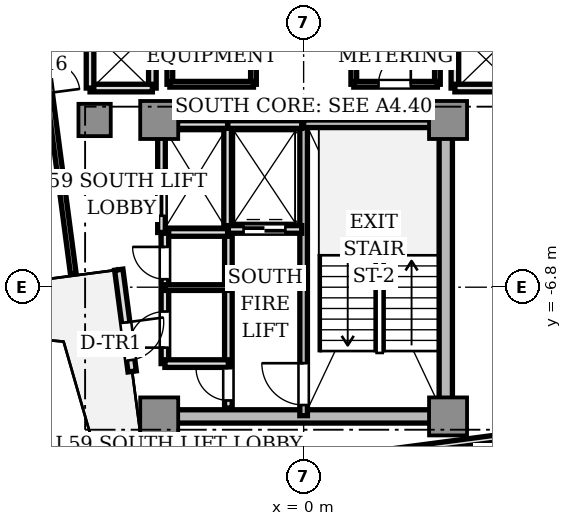
"""IFC4 building model, lengths in metres.
Left out: names, types, materials, properties, quantities, classifications, styles, units other than length and angle.
Written with IfcOpenShell. Run it as: python <this file> out.ifc"""

import sys

from ifc_helpers import new_model, si_unit, direction, frame, frame_2d, origin, origin_2d, place, context, subcontext, project, spatial, rectangle, extrude, source, transform, mapped, element, fill, save


model = new_model("IFC4")
c1 = context("Model", 3, precision=1e-05, world=origin(), true_north=direction((0.0, 1.0)))
c2 = subcontext(c1, "Body", "Model", "MODEL_VIEW")
j1 = project(units=[si_unit("LENGTHUNIT", "METRE"), si_unit("PLANEANGLEUNIT", "RADIAN")], contexts=[c1])
p1 = place(None, origin())
s1 = spatial("IfcSite", under=j1, at=p1, CompositionType="ELEMENT")
p2 = place(p1, origin())
s2 = spatial("IfcBuilding", under=s1, at=p2, CompositionType="ELEMENT")
p3 = place(p2, frame((0.0, 0.0, 213.2)))
s3 = spatial("IfcBuildingStorey", under=s2, at=p3, CompositionType="ELEMENT", Elevation=213.2)
p4 = place(p3, frame((-3.55, -10.2, 0.0), z_axis=(0.0, 0.0, 1.0), x_axis=(1.0, 0.0, 0.0)))
e1 = element("IfcWall", 1, at=p4, inside=s3, PredefinedType="SHEAR", context=c2, shape_type="SweptSolid", body=[
    extrude(rectangle(XDim=7.1, YDim=0.35, at=frame_2d((3.55, 0.0))), origin(), (0.0, 0.0, 1.0), 3.11),
])
p5 = place(p3, frame((3.74, -9.75, 0.0), z_axis=(0.0, 0.0, 1.0), x_axis=(0.0, 1.0, 0.0)))
e2 = element("IfcWall", 2, at=p5, inside=s3, PredefinedType="SHEAR", context=c2, shape_type="SweptSolid", body=[
    extrude(rectangle(XDim=6.9, YDim=0.35, at=frame_2d((3.45, 0.0))), origin(), (0.0, 0.0, 1.0), 3.11),
])
m1 = source(origin(), c2, "Body", "SweptSolid", [
    extrude(rectangle(XDim=1.0, YDim=1.0, at=origin_2d()), origin(), (0.0, 0.0, 1.0), 3.11),
])
for number, where, z_axis, x_axis in (
    (3, (-3.8, -2.4, 0.0), (0.0, 0.0, 1.0), (1.0, 0.0, 0.0)),
    (4, (3.8, -2.4, 0.0), (0.0, 0.0, 1.0), (1.0, 0.0, 0.0)),
    (5, (-3.8, -10.2, 0.0), (0.0, 0.0, 1.0), (1.0, 0.0, 0.0)),
    (6, (3.8, -10.2, 0.0), (0.0, 0.0, 1.0), (1.0, 0.0, 0.0)),
):
    element("IfcColumn", number, at=place(p3, frame(where, z_axis=z_axis, x_axis=x_axis)), inside=s3, PredefinedType="COLUMN", context=c2, shape_type="MappedRepresentation", body=[
        mapped(m1, transform((0.0, 0.0, 0.0), scale=1.0)),
    ])
m2 = source(origin(), c2, "Body", "SweptSolid", [
    extrude(rectangle(XDim=0.85, YDim=0.85, at=origin_2d()), origin(), (0.0, 0.0, 1.0), 3.11),
])
p6 = place(p3, frame((-5.5, -2.4, 0.0), z_axis=(0.0, 0.0, 1.0), x_axis=(1.0, 0.0, 0.0)))
e7 = element("IfcColumn", 7, at=p6, inside=s3, PredefinedType="COLUMN", context=c2, shape_type="MappedRepresentation", body=[
    mapped(m2, transform((0.0, 0.0, 0.0), scale=1.0)),
])
p7 = place(p3, frame((-4.864, -6.339, 0.0), z_axis=(0.0, 0.0, 1.0), x_axis=(0.130564442062, -0.991439824936, 0.0)))
e8 = element("IfcWall", 8, at=p7, inside=s3, PredefinedType="STANDARD", context=c2, shape_type="SweptSolid", body=[
    extrude(rectangle(XDim=2.7, YDim=0.22, at=frame_2d((1.35, 0.0))), origin(), (0.0, 0.0, 1.0), 3.11),
])
p8 = place(p7, frame((1.4, 0.0, 0.0)))
e9 = element("IfcOpeningElement", 9, at=p8, cuts=e8, PredefinedType="OPENING", context=c2, shape_type="SweptSolid", body=[
    extrude(rectangle(XDim=1.0, YDim=2.2, at=frame_2d((0.5, 1.1))), frame((0.0, 0.12, 0.0), z_axis=(0.0, -1.0, 0.0), x_axis=(1.0, 0.0, 0.0)), (0.0, 0.0, 1.0), 0.24),
])
p9 = place(p3, frame((0.0, -10.18, 0.0), z_axis=(0.0, 0.0, 1.0), x_axis=(0.0, 1.0, 0.0)))
e10 = element("IfcWall", 10, at=p9, inside=s3, PredefinedType="SOLIDWALL", context=c2, shape_type="SweptSolid", body=[
    extrude(rectangle(XDim=7.68, YDim=0.2, at=frame_2d((3.84, 0.0))), origin(), (0.0, 0.0, 1.0), 3.11),
])
p10 = place(p9, frame((0.28, 0.0, 0.0)))
e11 = element("IfcOpeningElement", 11, at=p10, cuts=e10, PredefinedType="OPENING", context=c2, shape_type="SweptSolid", body=[
    extrude(rectangle(XDim=1.1, YDim=2.15, at=frame_2d((0.55, 1.075))), frame((0.0, 0.11, 0.0), z_axis=(0.0, -1.0, 0.0), x_axis=(1.0, 0.0, 0.0)), (0.0, 0.0, 1.0), 0.22),
])
p11 = place(p3, frame((0.0, -2.5, 0.0), z_axis=(0.0, 0.0, 1.0), x_axis=(1.0, 0.0, 0.0)))
e12 = element("IfcWall", 12, at=p11, inside=s3, PredefinedType="SOLIDWALL", context=c2, shape_type="SweptSolid", body=[
    extrude(rectangle(XDim=3.72, YDim=0.2, at=frame_2d((1.86, 0.0))), origin(), (0.0, 0.0, 1.0), 3.11),
])
p12 = place(p3, frame((-1.98, -9.98, 0.0), z_axis=(0.0, 0.0, 1.0), x_axis=(0.0, 1.0, 0.0)))
e13 = element("IfcWall", 13, at=p12, inside=s3, PredefinedType="SOLIDWALL", context=c2, shape_type="SweptSolid", body=[
    extrude(rectangle(XDim=4.66, YDim=0.2, at=frame_2d((2.33, 0.0))), origin(), (0.0, 0.0, 1.0), 2.66),
])
p13 = place(p12, frame((0.2, 0.0, 0.0)))
e14 = element("IfcOpeningElement", 14, at=p13, cuts=e13, PredefinedType="OPENING", context=c2, shape_type="SweptSolid", body=[
    extrude(rectangle(XDim=0.85, YDim=2.1, at=frame_2d((0.425, 1.05))), frame((0.0, 0.11, 0.0), z_axis=(0.0, -1.0, 0.0), x_axis=(1.0, 0.0, 0.0)), (0.0, 0.0, 1.0), 0.22),
])
p14 = place(p3, frame((-2.0, -5.28, 0.0), z_axis=(0.0, 0.0, 1.0), x_axis=(0.0, 1.0, 0.0)))
e15 = element("IfcWall", 15, at=p14, inside=s3, PredefinedType="SOLIDWALL", context=c2, shape_type="SweptSolid", body=[
    extrude(rectangle(XDim=2.78, YDim=0.2, at=frame_2d((1.39, 0.0))), origin(), (0.0, 0.0, 1.0), 2.66),
])
p15 = place(p3, frame((-2.0, -2.52, 0.0), z_axis=(0.0, 0.0, 1.0), x_axis=(1.0, 0.0, 0.0)))
e16 = element("IfcWall", 16, at=p15, inside=s3, PredefinedType="SOLIDWALL", context=c2, shape_type="SweptSolid", body=[
    extrude(rectangle(XDim=1.95, YDim=0.2, at=frame_2d((0.975, 0.0))), origin(), (0.0, 0.0, 1.0), 2.66),
])
p16 = place(p3, frame((-1.98, -5.28, 0.0), z_axis=(0.0, 0.0, 1.0), x_axis=(1.0, 0.0, 0.0)))
e17 = element("IfcWall", 17, at=p16, inside=s3, PredefinedType="SOLIDWALL", context=c2, shape_type="SweptSolid", body=[
    extrude(rectangle(XDim=1.93, YDim=0.2, at=frame_2d((0.965, 0.0))), origin(), (0.0, 0.0, 1.0), 2.66),
])
p17 = place(p16, frame((0.4, 0.0, 0.0)))
e18 = element("IfcOpeningElement", 18, at=p17, cuts=e17, PredefinedType="OPENING", context=c2, shape_type="SweptSolid", body=[
    extrude(rectangle(XDim=1.1, YDim=2.2, at=frame_2d((0.55, 1.1))), frame((0.0, 0.11, 0.0), z_axis=(0.0, -1.0, 0.0), x_axis=(1.0, 0.0, 0.0)), (0.0, 0.0, 1.0), 0.22),
])
p18 = place(p3, frame((-3.32, -2.52, 0.0), z_axis=(0.0, 0.0, 1.0), x_axis=(1.0, 0.0, 0.0)))
e19 = element("IfcWall", 19, at=p18, inside=s3, PredefinedType="SOLIDWALL", context=c2, shape_type="SweptSolid", body=[
    extrude(rectangle(XDim=1.32, YDim=0.2, at=frame_2d((0.66, 0.0))), origin(), (0.0, 0.0, 1.0), 2.66),
])
p19 = place(p3, frame((-3.74, -5.36, 0.0), z_axis=(0.0, 0.0, 1.0), x_axis=(1.0, 0.0, 0.0)))
e20 = element("IfcWall", 20, at=p19, inside=s3, PredefinedType="SOLIDWALL", context=c2, shape_type="SweptSolid", body=[
    extrude(rectangle(XDim=1.74, YDim=0.2, at=frame_2d((0.87, 0.0))), origin(), (0.0, 0.0, 1.0), 2.66),
])
p20 = place(p3, frame((-3.74, -5.36, 0.0), z_axis=(0.0, 0.0, 1.0), x_axis=(0.0, 1.0, 0.0)))
e21 = element("IfcWall", 21, at=p20, inside=s3, PredefinedType="SOLIDWALL", context=c2, shape_type="SweptSolid", body=[
    extrude(rectangle(XDim=2.48, YDim=0.2, at=frame_2d((1.24, 0.0))), origin(), (0.0, 0.0, 1.0), 2.66),
])
p21 = place(p20, frame((0.44, 0.0, 0.0)))
e22 = element("IfcOpeningElement", 22, at=p21, cuts=e21, PredefinedType="OPENING", context=c2, shape_type="SweptSolid", body=[
    extrude(rectangle(XDim=1.2, YDim=2.2, at=frame_2d((0.6, 1.1))), frame((0.0, 0.11, 0.0), z_axis=(0.0, -1.0, 0.0), x_axis=(1.0, 0.0, 0.0)), (0.0, 0.0, 1.0), 0.22),
])
p22 = place(p3, frame((3.98, -1.56, 0.0), z_axis=(0.0, 0.0, 1.0), x_axis=(0.0, 1.0, 0.0)))
e23 = element("IfcWall", 23, at=p22, inside=s3, PredefinedType="SOLIDWALL", context=c2, shape_type="SweptSolid", body=[
    extrude(rectangle(XDim=3.12, YDim=0.2, at=frame_2d((1.56, 0.0))), origin(), (0.0, 0.0, 1.0), 2.33),
])
p23 = place(p3, frame((3.98, -1.56, 0.0), z_axis=(0.0, 0.0, 1.0), x_axis=(1.0, 0.0, 0.0)))
e24 = element("IfcWall", 24, at=p23, inside=s3, PredefinedType="SOLIDWALL", context=c2, shape_type="SweptSolid", body=[
    extrude(rectangle(XDim=1.64, YDim=0.2, at=frame_2d((0.82, 0.0))), origin(), (0.0, 0.0, 1.0), 2.66),
])
p24 = place(p3, frame((-3.98, -1.56, 0.0), z_axis=(0.0, 0.0, 1.0), x_axis=(0.0, 1.0, 0.0)))
e25 = element("IfcWall", 25, at=p24, inside=s3, PredefinedType="SOLIDWALL", context=c2, shape_type="SweptSolid", body=[
    extrude(rectangle(XDim=3.12, YDim=0.2, at=frame_2d((1.56, 0.0))), origin(), (0.0, 0.0, 1.0), 2.33),
])
p25 = place(p3, frame((-5.62, -1.56, 0.0), z_axis=(0.0, 0.0, 1.0), x_axis=(1.0, 0.0, 0.0)))
e26 = element("IfcWall", 26, at=p25, inside=s3, PredefinedType="SOLIDWALL", context=c2, shape_type="SweptSolid", body=[
    extrude(rectangle(XDim=1.64, YDim=0.2, at=frame_2d((0.82, 0.0))), origin(), (0.0, 0.0, 1.0), 2.66),
])
p26 = place(p3, frame((-5.62, -1.56, 0.0), z_axis=(0.0, 0.0, 1.0), x_axis=(0.0, 1.0, 0.0)))
e27 = element("IfcWall", 27, at=p26, inside=s3, PredefinedType="SOLIDWALL", context=c2, shape_type="SweptSolid", body=[
    extrude(rectangle(XDim=1.56, YDim=0.2, at=frame_2d((0.78, 0.0))), origin(), (0.0, 0.0, 1.0), 2.66),
])
p27 = place(p3, frame((-3.65, -8.81, 0.0), z_axis=(0.0, 0.0, 1.0), x_axis=(0.0, 1.0, 0.0)))
e28 = element("IfcWall", 28, at=p27, inside=s3, PredefinedType="SOLIDWALL", context=c2, shape_type="SweptSolid", body=[
    extrude(rectangle(XDim=3.43, YDim=0.2, at=frame_2d((1.715, 0.0))), origin(), (0.0, 0.0, 1.0), 2.66),
])
p28 = place(p27, frame((0.42, 0.0, 0.0)))
e29 = element("IfcOpeningElement", 29, at=p28, cuts=e28, PredefinedType="OPENING", context=c2, shape_type="SweptSolid", body=[
    extrude(rectangle(XDim=0.95, YDim=2.15, at=frame_2d((0.475, 1.075))), frame((0.0, 0.11, 0.0), z_axis=(0.0, -1.0, 0.0), x_axis=(1.0, 0.0, 0.0)), (0.0, 0.0, 1.0), 0.22),
])
p29 = place(p27, frame((2.22, 0.0, 0.0)))
e30 = element("IfcOpeningElement", 30, at=p29, cuts=e28, PredefinedType="OPENING", context=c2, shape_type="SweptSolid", body=[
    extrude(rectangle(XDim=0.85, YDim=2.1, at=frame_2d((0.425, 1.05))), frame((0.0, 0.11, 0.0), z_axis=(0.0, -1.0, 0.0), x_axis=(1.0, 0.0, 0.0)), (0.0, 0.0, 1.0), 0.22),
])
p30 = place(p3, frame((-3.65, -8.81, 0.0), z_axis=(0.0, 0.0, 1.0), x_axis=(1.0, 0.0, 0.0)))
e31 = element("IfcWall", 31, at=p30, inside=s3, PredefinedType="SOLIDWALL", context=c2, shape_type="SweptSolid", body=[
    extrude(rectangle(XDim=1.67, YDim=0.2, at=frame_2d((0.835, 0.0))), origin(), (0.0, 0.0, 1.0), 2.66),
])
p31 = place(p3, frame((-3.65, -6.81, 0.0), z_axis=(0.0, 0.0, 1.0), x_axis=(1.0, 0.0, 0.0)))
e32 = element("IfcWall", 32, at=p31, inside=s3, PredefinedType="PARTITIONING", context=c2, shape_type="SweptSolid", body=[
    extrude(rectangle(XDim=1.67, YDim=0.15, at=frame_2d((0.835, 0.0))), origin(), (0.0, 0.0, 1.0), 2.66),
])
p32 = place(p3, frame((-1.32, -1.46, 0.0), z_axis=(0.0, 0.0, 1.0), x_axis=(0.0, 1.0, 0.0)))
e33 = element("IfcWall", 33, at=p32, inside=s3, PredefinedType="PARTITIONING", context=c2, shape_type="SweptSolid", body=[
    extrude(rectangle(XDim=2.92, YDim=0.15, at=frame_2d((1.46, 0.0))), origin(), (0.0, 0.0, 1.0), 2.66),
])
p33 = place(p3, frame((-3.52, -1.46, 0.0), z_axis=(0.0, 0.0, 1.0), x_axis=(0.0, 1.0, 0.0)))
e34 = element("IfcWall", 34, at=p33, inside=s3, PredefinedType="PARTITIONING", context=c2, shape_type="SweptSolid", body=[
    extrude(rectangle(XDim=2.92, YDim=0.15, at=frame_2d((1.46, 0.0))), origin(), (0.0, 0.0, 1.0), 2.33),
])
p34 = place(p3, frame((-3.52, -1.46, 0.0), z_axis=(0.0, 0.0, 1.0), x_axis=(1.0, 0.0, 0.0)))
e35 = element("IfcWall", 35, at=p34, inside=s3, PredefinedType="PARTITIONING", context=c2, shape_type="SweptSolid", body=[
    extrude(rectangle(XDim=2.2, YDim=0.15, at=frame_2d((1.1, 0.0))), origin(), (0.0, 0.0, 1.0), 2.66),
])
p35 = place(p3, frame((1.32, -1.46, 0.0), z_axis=(0.0, 0.0, 1.0), x_axis=(0.0, 1.0, 0.0)))
e36 = element("IfcWall", 36, at=p35, inside=s3, PredefinedType="PARTITIONING", context=c2, shape_type="SweptSolid", body=[
    extrude(rectangle(XDim=2.92, YDim=0.15, at=frame_2d((1.46, 0.0))), origin(), (0.0, 0.0, 1.0), 2.66),
])
p36 = place(p3, frame((3.52, -1.46, 0.0), z_axis=(0.0, 0.0, 1.0), x_axis=(0.0, 1.0, 0.0)))
e37 = element("IfcWall", 37, at=p36, inside=s3, PredefinedType="PARTITIONING", context=c2, shape_type="SweptSolid", body=[
    extrude(rectangle(XDim=2.92, YDim=0.15, at=frame_2d((1.46, 0.0))), origin(), (0.0, 0.0, 1.0), 2.33),
])
p37 = place(p3, frame((1.32, -1.46, 0.0), z_axis=(0.0, 0.0, 1.0), x_axis=(1.0, 0.0, 0.0)))
e38 = element("IfcWall", 38, at=p37, inside=s3, PredefinedType="PARTITIONING", context=c2, shape_type="SweptSolid", body=[
    extrude(rectangle(XDim=2.2, YDim=0.15, at=frame_2d((1.1, 0.0))), origin(), (0.0, 0.0, 1.0), 2.66),
])
p38 = place(p37, frame((0.65, 0.0, 0.0)))
e39 = element("IfcOpeningElement", 39, at=p38, cuts=e38, PredefinedType="OPENING", context=c2, shape_type="SweptSolid", body=[
    extrude(rectangle(XDim=0.85, YDim=2.1, at=frame_2d((0.425, 1.05))), frame((0.0, 0.085, 0.0), z_axis=(0.0, -1.0, 0.0), x_axis=(1.0, 0.0, 0.0)), (0.0, 0.0, 1.0), 0.17),
])
p39 = place(p3, frame((-7.522, 4.658, 0.0), z_axis=(0.0, 0.0, 1.0), x_axis=(0.130505824974, -0.99144754256, 0.0)))
e40 = element("IfcWall", 40, at=p39, inside=s3, PredefinedType="PARTITIONING", context=c2, shape_type="SweptSolid", body=[
    extrude(rectangle(XDim=11.2, YDim=0.15, at=frame_2d((5.6, 0.0))), origin(), (0.0, 0.0, 1.0), 2.66),
])
p40 = place(p39, frame((4.8, 0.0, 0.0)))
e41 = element("IfcOpeningElement", 41, at=p40, cuts=e40, PredefinedType="OPENING", context=c2, shape_type="SweptSolid", body=[
    extrude(rectangle(XDim=1.6, YDim=2.25, at=frame_2d((0.8, 1.125))), frame((0.0, 0.085, 0.0), z_axis=(0.0, -1.0, 0.0), x_axis=(1.0, 0.0, 0.0)), (0.0, 0.0, 1.0), 0.17),
])
p41 = place(p3, frame((2.423, -11.129, 0.0), z_axis=(0.0, 0.0, 1.0), x_axis=(0.991445715827, 0.13051970184, 0.0)))
e42 = element("IfcWall", 42, at=p41, inside=s3, PredefinedType="PARTITIONING", context=c2, shape_type="SweptSolid", body=[
    extrude(rectangle(XDim=4.65, YDim=0.18, at=frame_2d((2.325, 0.0))), origin(), (0.0, 0.0, 1.0), 2.66),
])
m3 = source(origin(), c2, "Body", "SweptSolid", [
    extrude(rectangle(XDim=1.0, YDim=0.05, at=origin_2d()), origin(), (0.0, 0.0, 1.0), 2.2),
])
p42 = place(p8, frame((0.5, 0.0, 0.0)))
e43 = element("IfcDoor", 43, at=p42, inside=s3, OperationType="SINGLE_SWING_LEFT", PredefinedType="DOOR", context=c2, shape_type="MappedRepresentation", body=[
    mapped(m3, transform((0.0, 0.0, 0.0), scale=1.0)),
])
fill(e9, e43)
m4 = source(origin(), c2, "Body", "SweptSolid", [
    extrude(rectangle(XDim=1.1, YDim=0.05, at=origin_2d()), origin(), (0.0, 0.0, 1.0), 2.15),
])
p43 = place(p10, frame((0.55, 0.0, 0.0)))
e44 = element("IfcDoor", 44, at=p43, inside=s3, OperationType="SINGLE_SWING_RIGHT", PredefinedType="DOOR", context=c2, shape_type="MappedRepresentation", body=[
    mapped(m4, transform((0.0, 0.0, 0.0), scale=1.0)),
])
fill(e11, e44)
m5 = source(origin(), c2, "Body", "SweptSolid", [
    extrude(rectangle(XDim=0.85, YDim=0.05, at=origin_2d()), origin(), (0.0, 0.0, 1.0), 2.1),
])
p44 = place(p13, frame((0.425, 0.0, 0.0)))
e45 = element("IfcDoor", 45, at=p44, inside=s3, OperationType="SINGLE_SWING_RIGHT", PredefinedType="DOOR", context=c2, shape_type="MappedRepresentation", body=[
    mapped(m5, transform((0.0, 0.0, 0.0), scale=1.0)),
])
fill(e14, e45)
m6 = source(origin(), c2, "Body", "SweptSolid", [
    extrude(rectangle(XDim=1.1, YDim=0.05, at=origin_2d()), origin(), (0.0, 0.0, 1.0), 2.2),
])
p45 = place(p17, frame((0.55, 0.0, 0.0)))
e46 = element("IfcDoor", 46, at=p45, inside=s3, OperationType="DOUBLE_DOOR_SLIDING", PredefinedType="DOOR", context=c2, shape_type="MappedRepresentation", body=[
    mapped(m6, transform((0.0, 0.0, 0.0), scale=1.0)),
])
fill(e18, e46)
m7 = source(origin(), c2, "Body", "SweptSolid", [
    extrude(rectangle(XDim=1.2, YDim=0.05, at=origin_2d()), origin(), (0.0, 0.0, 1.0), 2.2),
])
p46 = place(p21, frame((0.6, 0.0, 0.0)))
e47 = element("IfcDoor", 47, at=p46, inside=s3, OperationType="DOUBLE_DOOR_SLIDING", PredefinedType="DOOR", context=c2, shape_type="MappedRepresentation", body=[
    mapped(m7, transform((0.0, 0.0, 0.0), scale=1.0)),
])
fill(e22, e47)
m8 = source(origin(), c2, "Body", "SweptSolid", [
    extrude(rectangle(XDim=0.95, YDim=0.05, at=origin_2d()), origin(), (0.0, 0.0, 1.0), 2.15),
])
p47 = place(p28, frame((0.475, 0.0, 0.0)))
e48 = element("IfcDoor", 48, at=p47, inside=s3, OperationType="SINGLE_SWING_LEFT", PredefinedType="DOOR", context=c2, shape_type="MappedRepresentation", body=[
    mapped(m8, transform((0.0, 0.0, 0.0), scale=1.0)),
])
fill(e29, e48)
p48 = place(p29, frame((0.425, 0.0, 0.0)))
e49 = element("IfcDoor", 49, at=p48, inside=s3, OperationType="SINGLE_SWING_RIGHT", PredefinedType="DOOR", context=c2, shape_type="MappedRepresentation", body=[
    mapped(m5, transform((0.0, 0.0, 0.0), scale=1.0)),
])
fill(e30, e49)
p49 = place(p38, frame((0.425, 0.0, 0.0)))
e50 = element("IfcDoor", 50, at=p49, inside=s3, OperationType="SINGLE_SWING_RIGHT", PredefinedType="DOOR", context=c2, shape_type="MappedRepresentation", body=[
    mapped(m5, transform((0.0, 0.0, 0.0), scale=1.0)),
])
fill(e39, e50)
save(model, sys.argv[1])
